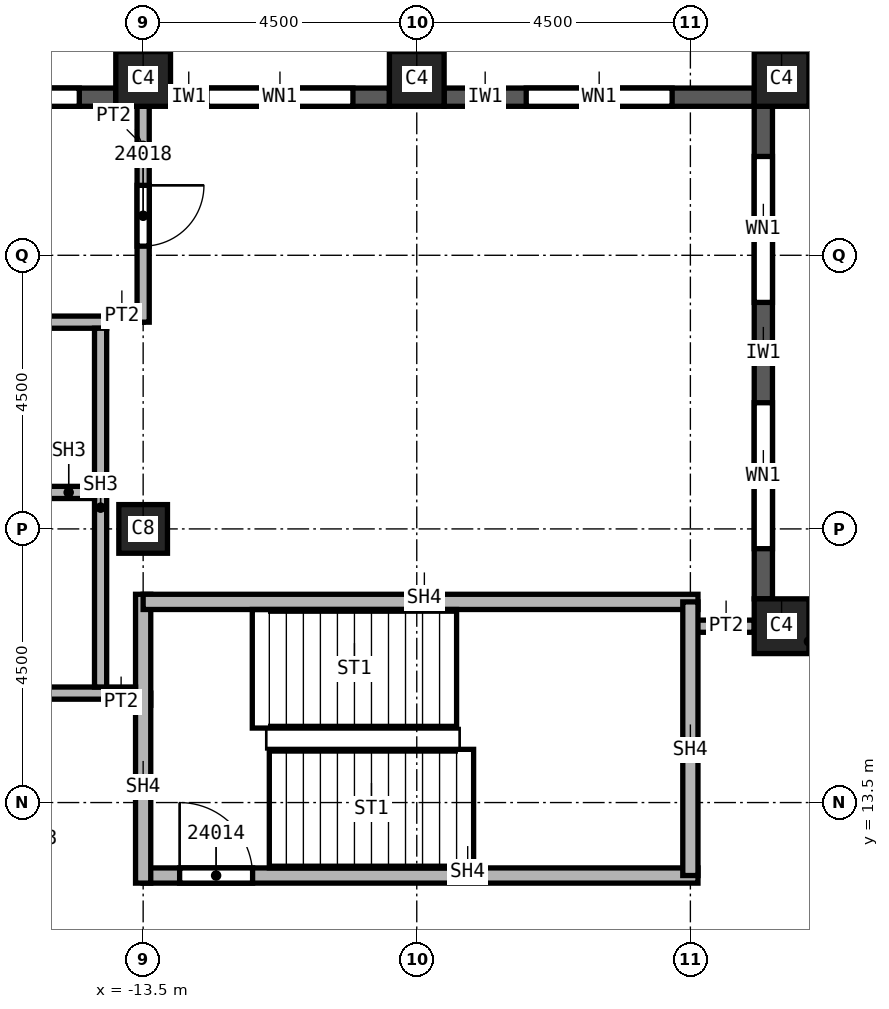
"""IFC4 building model, lengths in metres.
Left out: names, types, materials, properties, quantities, classifications, styles, units other than length and angle.
Written with IfcOpenShell. Run it as: python <this file> out.ifc"""

import sys

from ifc_helpers import new_model, si_unit, direction, frame, frame_2d, origin, origin_2d, place, context, subcontext, project, spatial, rectangle, extrude, element, fill, save


model = new_model("IFC4")
c1 = context("Model", 3, precision=1e-05, world=origin(), true_north=direction((0.0, 1.0)))
c2 = subcontext(c1, "Body", "Model", "MODEL_VIEW")
j1 = project(units=[si_unit("LENGTHUNIT", "METRE"), si_unit("PLANEANGLEUNIT", "RADIAN")], contexts=[c1])
p1 = place(None, origin())
s1 = spatial("IfcSite", under=j1, at=p1, CompositionType="ELEMENT")
p2 = place(p1, origin())
s2 = spatial("IfcBuilding", under=s1, at=p2, CompositionType="ELEMENT")
p3 = place(p2, frame((0.0, 0.0, 338.0)))
s3 = spatial("IfcBuildingStorey", under=s2, at=p3, CompositionType="ELEMENT", Elevation=338.0)
p4 = place(p3, frame((-13.5, 18.0, 0.0), z_axis=(0.0, 0.0, 1.0), x_axis=(1.0, 0.0, 0.0)))
e1 = element("IfcColumn", 1, at=p4, inside=s3, PredefinedType="COLUMN", context=c2, shape_type="SweptSolid", body=[
    extrude(rectangle(XDim=0.8, YDim=0.8, at=origin_2d()), origin(), (0.0, 0.0, 1.0), 3.74),
])
for number, where, z_axis, x_axis in (
    (2, (-3.0, 25.4, 0.0), (0.0, 0.0, 1.0), (1.0, 0.0, 0.0)),
    (3, (-9.0, 25.4, 0.0), (0.0, 0.0, 1.0), (1.0, 0.0, 0.0)),
    (4, (-13.5, 25.4, 0.0), (0.0, 0.0, 1.0), (1.0, 0.0, 0.0)),
    (5, (-3.0, 16.4, 0.0), (0.0, 0.0, 1.0), (1.0, 0.0, 0.0)),
):
    element("IfcColumn", number, at=place(p3, frame(where, z_axis=z_axis, x_axis=x_axis)), inside=s3, PredefinedType="COLUMN", context=c2, shape_type="SweptSolid", body=[
        extrude(rectangle(XDim=0.9, YDim=0.9, at=origin_2d()), origin(), (0.0, 0.0, 1.0), 3.74),
    ])
p5 = place(p3, frame((-3.3, 16.85, 0.0), z_axis=(0.0, 0.0, 1.0), x_axis=(0.0, 1.0, 0.0)))
e6 = element("IfcWall", 6, at=p5, inside=s3, PredefinedType="SOLIDWALL", context=c2, shape_type="SweptSolid", body=[
    extrude(rectangle(XDim=8.1, YDim=0.3, at=frame_2d((4.05, 0.0))), origin(), (0.0, 0.0, 1.0), 3.14),
])
p6 = place(p5, frame((0.825, 0.0, 0.8)))
e7 = element("IfcOpeningElement", 7, at=p6, cuts=e6, PredefinedType="OPENING", context=c2, shape_type="SweptSolid", body=[
    extrude(rectangle(XDim=2.4, YDim=1.95, at=frame_2d((1.2, 0.975))), frame((0.0, 0.15, 0.0), z_axis=(0.0, -1.0, 0.0), x_axis=(1.0, 0.0, 0.0)), (0.0, 0.0, 1.0), 0.3),
])
p7 = place(p5, frame((4.875, 0.0, 0.8)))
e8 = element("IfcOpeningElement", 8, at=p7, cuts=e6, PredefinedType="OPENING", context=c2, shape_type="SweptSolid", body=[
    extrude(rectangle(XDim=2.4, YDim=1.95, at=frame_2d((1.2, 0.975))), frame((0.0, 0.15, 0.0), z_axis=(0.0, -1.0, 0.0), x_axis=(1.0, 0.0, 0.0)), (0.0, 0.0, 1.0), 0.3),
])
p8 = place(p3, frame((-3.45, 25.1, 0.0), z_axis=(0.0, 0.0, 1.0), x_axis=(-1.0, 0.0, 0.0)))
e9 = element("IfcWall", 9, at=p8, inside=s3, PredefinedType="SOLIDWALL", context=c2, shape_type="SweptSolid", body=[
    extrude(rectangle(XDim=5.1, YDim=0.3, at=frame_2d((2.55, 0.0))), origin(), (0.0, 0.0, 1.0), 3.14),
])
p9 = place(p8, frame((1.35, 0.0, 0.8)))
e10 = element("IfcOpeningElement", 10, at=p9, cuts=e9, PredefinedType="OPENING", context=c2, shape_type="SweptSolid", body=[
    extrude(rectangle(XDim=2.4, YDim=1.95, at=frame_2d((1.2, 0.975))), frame((0.0, 0.15, 0.0), z_axis=(0.0, -1.0, 0.0), x_axis=(1.0, 0.0, 0.0)), (0.0, 0.0, 1.0), 0.3),
])
p10 = place(p3, frame((-9.45, 25.1, 0.0), z_axis=(0.0, 0.0, 1.0), x_axis=(-1.0, 0.0, 0.0)))
e11 = element("IfcWall", 11, at=p10, inside=s3, PredefinedType="SOLIDWALL", context=c2, shape_type="SweptSolid", body=[
    extrude(rectangle(XDim=3.6, YDim=0.3, at=frame_2d((1.8, 0.0))), origin(), (0.0, 0.0, 1.0), 3.14),
])
p11 = place(p10, frame((0.6, 0.0, 0.8)))
e12 = element("IfcOpeningElement", 12, at=p11, cuts=e11, PredefinedType="OPENING", context=c2, shape_type="SweptSolid", body=[
    extrude(rectangle(XDim=2.4, YDim=1.95, at=frame_2d((1.2, 0.975))), frame((0.0, 0.15, 0.0), z_axis=(0.0, -1.0, 0.0), x_axis=(1.0, 0.0, 0.0)), (0.0, 0.0, 1.0), 0.3),
])
p12 = place(p3, frame((-13.95, 25.1, 0.0), z_axis=(0.0, 0.0, 1.0), x_axis=(-1.0, 0.0, 0.0)))
e13 = element("IfcWall", 13, at=p12, inside=s3, PredefinedType="SOLIDWALL", context=c2, shape_type="SweptSolid", body=[
    extrude(rectangle(XDim=3.6, YDim=0.3, at=frame_2d((1.8, 0.0))), origin(), (0.0, 0.0, 1.0), 3.14),
])
p13 = place(p12, frame((0.6, 0.0, 0.8)))
e14 = element("IfcOpeningElement", 14, at=p13, cuts=e13, PredefinedType="OPENING", context=c2, shape_type="SweptSolid", body=[
    extrude(rectangle(XDim=2.4, YDim=1.95, at=frame_2d((1.2, 0.975))), frame((0.0, 0.15, 0.0), z_axis=(0.0, -1.0, 0.0), x_axis=(1.0, 0.0, 0.0)), (0.0, 0.0, 1.0), 0.3),
])
p14 = place(p3, frame((-14.1, 15.2, 0.0), z_axis=(0.0, 0.0, 1.0), x_axis=(1.0, 0.0, 0.0)))
e15 = element("IfcWall", 15, at=p14, inside=s3, PredefinedType="PARTITIONING", context=c2, shape_type="SweptSolid", body=[
    extrude(rectangle(XDim=0.725, YDim=0.2, at=frame_2d((0.363, 0.0))), origin(), (0.0, 0.0, 1.0), 3.74),
])
p15 = place(p3, frame((-13.5, 21.5, 0.0), z_axis=(0.0, 0.0, 1.0), x_axis=(-1.0, 0.0, 0.0)))
e16 = element("IfcWall", 16, at=p15, inside=s3, PredefinedType="PARTITIONING", context=c2, shape_type="SweptSolid", body=[
    extrude(rectangle(XDim=0.6, YDim=0.2, at=frame_2d((0.3, 0.0))), origin(), (0.0, 0.0, 1.0), 3.74),
])
p16 = place(p3, frame((-13.5, 24.95, 0.0), z_axis=(0.0, 0.0, 1.0), x_axis=(0.0, -1.0, 0.0)))
e17 = element("IfcWall", 17, at=p16, inside=s3, PredefinedType="PARTITIONING", context=c2, shape_type="SweptSolid", body=[
    extrude(rectangle(XDim=3.55, YDim=0.2, at=frame_2d((1.775, 0.0))), origin(), (0.0, 0.0, 1.0), 3.74),
])
p17 = place(p16, frame((1.3, 0.0, 0.0)))
e18 = element("IfcOpeningElement", 18, at=p17, cuts=e17, PredefinedType="OPENING", context=c2, shape_type="SweptSolid", body=[
    extrude(rectangle(XDim=1.0, YDim=2.1, at=frame_2d((0.5, 1.05))), frame((0.0, 0.1, 0.0), z_axis=(0.0, -1.0, 0.0), x_axis=(1.0, 0.0, 0.0)), (0.0, 0.0, 1.0), 0.2),
])
p18 = place(p3, frame((-4.5, 16.4, 0.0), z_axis=(0.0, 0.0, 1.0), x_axis=(1.0, 0.0, 0.0)))
e19 = element("IfcWall", 19, at=p18, inside=s3, PredefinedType="PARTITIONING", context=c2, shape_type="SweptSolid", body=[
    extrude(rectangle(XDim=1.05, YDim=0.2, at=frame_2d((0.525, 0.0))), origin(), (0.0, 0.0, 1.0), 3.74),
])
p19 = place(p3, frame((-13.5, 12.3, 0.0), z_axis=(0.0, 0.0, 1.0), x_axis=(1.0, 0.0, 0.0)))
e20 = element("IfcWall", 20, at=p19, inside=s3, PredefinedType="SOLIDWALL", context=c2, shape_type="SweptSolid", body=[
    extrude(rectangle(XDim=9.125, YDim=0.25, at=frame_2d((4.562, 0.0))), origin(), (0.0, 0.0, 1.0), 3.74),
])
p20 = place(p19, frame((0.6, 0.0, 0.0)))
e21 = element("IfcOpeningElement", 21, at=p20, cuts=e20, PredefinedType="OPENING", context=c2, shape_type="SweptSolid", body=[
    extrude(rectangle(XDim=1.2, YDim=2.1, at=frame_2d((0.6, 1.05))), frame((0.0, 0.125, 0.0), z_axis=(0.0, -1.0, 0.0), x_axis=(1.0, 0.0, 0.0)), (0.0, 0.0, 1.0), 0.25),
])
p21 = place(p3, frame((-13.5, 12.175, 0.0), z_axis=(0.0, 0.0, 1.0), x_axis=(0.0, 1.0, 0.0)))
e22 = element("IfcWall", 22, at=p21, inside=s3, PredefinedType="SOLIDWALL", context=c2, shape_type="SweptSolid", body=[
    extrude(rectangle(XDim=4.75, YDim=0.25, at=frame_2d((2.375, 0.0))), origin(), (0.0, 0.0, 1.0), 3.74),
])
p22 = place(p3, frame((-13.5, 16.8, 0.0), z_axis=(0.0, 0.0, 1.0), x_axis=(1.0, 0.0, 0.0)))
e23 = element("IfcWall", 23, at=p22, inside=s3, PredefinedType="SOLIDWALL", context=c2, shape_type="SweptSolid", body=[
    extrude(rectangle(XDim=9.125, YDim=0.25, at=frame_2d((4.562, 0.0))), origin(), (0.0, 0.0, 1.0), 3.74),
])
p23 = place(p3, frame((-4.5, 16.8, 0.0), z_axis=(0.0, 0.0, 1.0), x_axis=(0.0, -1.0, 0.0)))
e24 = element("IfcWall", 24, at=p23, inside=s3, PredefinedType="SOLIDWALL", context=c2, shape_type="SweptSolid", body=[
    extrude(rectangle(XDim=4.5, YDim=0.25, at=frame_2d((2.25, 0.0))), origin(), (0.0, 0.0, 1.0), 3.74),
])
p24 = place(p3, frame((-21.9, 15.3, 0.0), z_axis=(0.0, 0.0, 1.0), x_axis=(1.0, 0.0, 0.0)))
e25 = element("IfcWall", 25, at=p24, inside=s3, PredefinedType="SOLIDWALL", context=c2, shape_type="SweptSolid", body=[
    extrude(rectangle(XDim=8.275, YDim=0.2, at=frame_2d((4.137, 0.0))), origin(), (0.0, 0.0, 1.0), 3.74),
])
p25 = place(p24, frame((4.8, 0.0, 0.0)))
e26 = element("IfcOpeningElement", 26, at=p25, cuts=e25, PredefinedType="OPENING", context=c2, shape_type="SweptSolid", body=[
    extrude(rectangle(XDim=1.2, YDim=2.1, at=frame_2d((0.6, 1.05))), frame((0.0, 0.1, 0.0), z_axis=(0.0, -1.0, 0.0), x_axis=(1.0, 0.0, 0.0)), (0.0, 0.0, 1.0), 0.2),
])
p26 = place(p3, frame((-21.9, 21.4, 0.0), z_axis=(0.0, 0.0, 1.0), x_axis=(1.0, 0.0, 0.0)))
e27 = element("IfcWall", 27, at=p26, inside=s3, PredefinedType="SOLIDWALL", context=c2, shape_type="SweptSolid", body=[
    extrude(rectangle(XDim=7.8, YDim=0.2, at=frame_2d((3.9, 0.0))), origin(), (0.0, 0.0, 1.0), 3.74),
])
p27 = place(p26, frame((3.2, 0.0, 0.0)))
e28 = element("IfcOpeningElement", 28, at=p27, cuts=e27, PredefinedType="OPENING", context=c2, shape_type="SweptSolid", body=[
    extrude(rectangle(XDim=1.2, YDim=2.1, at=frame_2d((0.6, 1.05))), frame((0.0, 0.1, 0.0), z_axis=(0.0, -1.0, 0.0), x_axis=(1.0, 0.0, 0.0)), (0.0, 0.0, 1.0), 0.2),
])
p28 = place(p3, frame((-14.2, 15.4, 0.0), z_axis=(0.0, 0.0, 1.0), x_axis=(0.0, 1.0, 0.0)))
e29 = element("IfcWall", 29, at=p28, inside=s3, PredefinedType="SOLIDWALL", context=c2, shape_type="SweptSolid", body=[
    extrude(rectangle(XDim=5.9, YDim=0.2, at=frame_2d((2.95, 0.0))), origin(), (0.0, 0.0, 1.0), 3.74),
])
p29 = place(p3, frame((-17.1, 18.6, 0.0), z_axis=(0.0, 0.0, 1.0), x_axis=(1.0, 0.0, 0.0)))
e30 = element("IfcWall", 30, at=p29, inside=s3, PredefinedType="SOLIDWALL", context=c2, shape_type="SweptSolid", body=[
    extrude(rectangle(XDim=2.8, YDim=0.2, at=frame_2d((1.4, 0.0))), origin(), (0.0, 0.0, 1.0), 3.74),
])
p30 = place(p29, frame((0.85, 0.0, 0.0)))
e31 = element("IfcOpeningElement", 31, at=p30, cuts=e30, PredefinedType="OPENING", context=c2, shape_type="SweptSolid", body=[
    extrude(rectangle(XDim=1.1, YDim=2.1, at=frame_2d((0.55, 1.05))), frame((0.0, 0.1, 0.0), z_axis=(0.0, -1.0, 0.0), x_axis=(1.0, 0.0, 0.0)), (0.0, 0.0, 1.0), 0.2),
])
p31 = place(p6, origin())
e32 = element("IfcWindow", 32, at=p31, inside=s3, PartitioningType="SINGLE_PANEL", PredefinedType="WINDOW", context=c2, shape_type="SweptSolid", body=[
    extrude(rectangle(XDim=2.4, YDim=1.95, at=frame_2d((1.2, 0.975))), frame((0.0, 0.03, 0.0), z_axis=(0.0, -1.0, 0.0), x_axis=(1.0, 0.0, 0.0)), (0.0, 0.0, 1.0), 0.06),
])
fill(e7, e32)
p32 = place(p7, origin())
e33 = element("IfcWindow", 33, at=p32, inside=s3, PartitioningType="SINGLE_PANEL", PredefinedType="WINDOW", context=c2, shape_type="SweptSolid", body=[
    extrude(rectangle(XDim=2.4, YDim=1.95, at=frame_2d((1.2, 0.975))), frame((0.0, 0.03, 0.0), z_axis=(0.0, -1.0, 0.0), x_axis=(1.0, 0.0, 0.0)), (0.0, 0.0, 1.0), 0.06),
])
fill(e8, e33)
p33 = place(p9, origin())
e34 = element("IfcWindow", 34, at=p33, inside=s3, PartitioningType="SINGLE_PANEL", PredefinedType="WINDOW", context=c2, shape_type="SweptSolid", body=[
    extrude(rectangle(XDim=2.4, YDim=1.95, at=frame_2d((1.2, 0.975))), frame((0.0, 0.03, 0.0), z_axis=(0.0, -1.0, 0.0), x_axis=(1.0, 0.0, 0.0)), (0.0, 0.0, 1.0), 0.06),
])
fill(e10, e34)
p34 = place(p11, origin())
e35 = element("IfcWindow", 35, at=p34, inside=s3, PartitioningType="SINGLE_PANEL", PredefinedType="WINDOW", context=c2, shape_type="SweptSolid", body=[
    extrude(rectangle(XDim=2.4, YDim=1.95, at=frame_2d((1.2, 0.975))), frame((0.0, 0.03, 0.0), z_axis=(0.0, -1.0, 0.0), x_axis=(1.0, 0.0, 0.0)), (0.0, 0.0, 1.0), 0.06),
])
fill(e12, e35)
p35 = place(p13, origin())
e36 = element("IfcWindow", 36, at=p35, inside=s3, PartitioningType="SINGLE_PANEL", PredefinedType="WINDOW", context=c2, shape_type="SweptSolid", body=[
    extrude(rectangle(XDim=2.4, YDim=1.95, at=frame_2d((1.2, 0.975))), frame((0.0, 0.03, 0.0), z_axis=(0.0, -1.0, 0.0), x_axis=(1.0, 0.0, 0.0)), (0.0, 0.0, 1.0), 0.06),
])
fill(e14, e36)
p36 = place(p20, origin())
e37 = element("IfcDoor", 37, at=p36, inside=s3, OperationType="SINGLE_SWING_LEFT", PredefinedType="DOOR", context=c2, shape_type="SweptSolid", body=[
    extrude(rectangle(XDim=1.2, YDim=2.1, at=frame_2d((0.6, 1.05))), frame((0.0, 0.025, 0.0), z_axis=(0.0, -1.0, 0.0), x_axis=(1.0, 0.0, 0.0)), (0.0, 0.0, 1.0), 0.05),
])
fill(e21, e37)
p37 = place(p17, origin())
e38 = element("IfcDoor", 38, at=p37, inside=s3, OperationType="SINGLE_SWING_LEFT", PredefinedType="DOOR", context=c2, shape_type="SweptSolid", body=[
    extrude(rectangle(XDim=1.0, YDim=2.1, at=frame_2d((0.5, 1.05))), frame((0.0, 0.025, 0.0), z_axis=(0.0, -1.0, 0.0), x_axis=(1.0, 0.0, 0.0)), (0.0, 0.0, 1.0), 0.05),
])
fill(e18, e38)
save(model, sys.argv[1])
